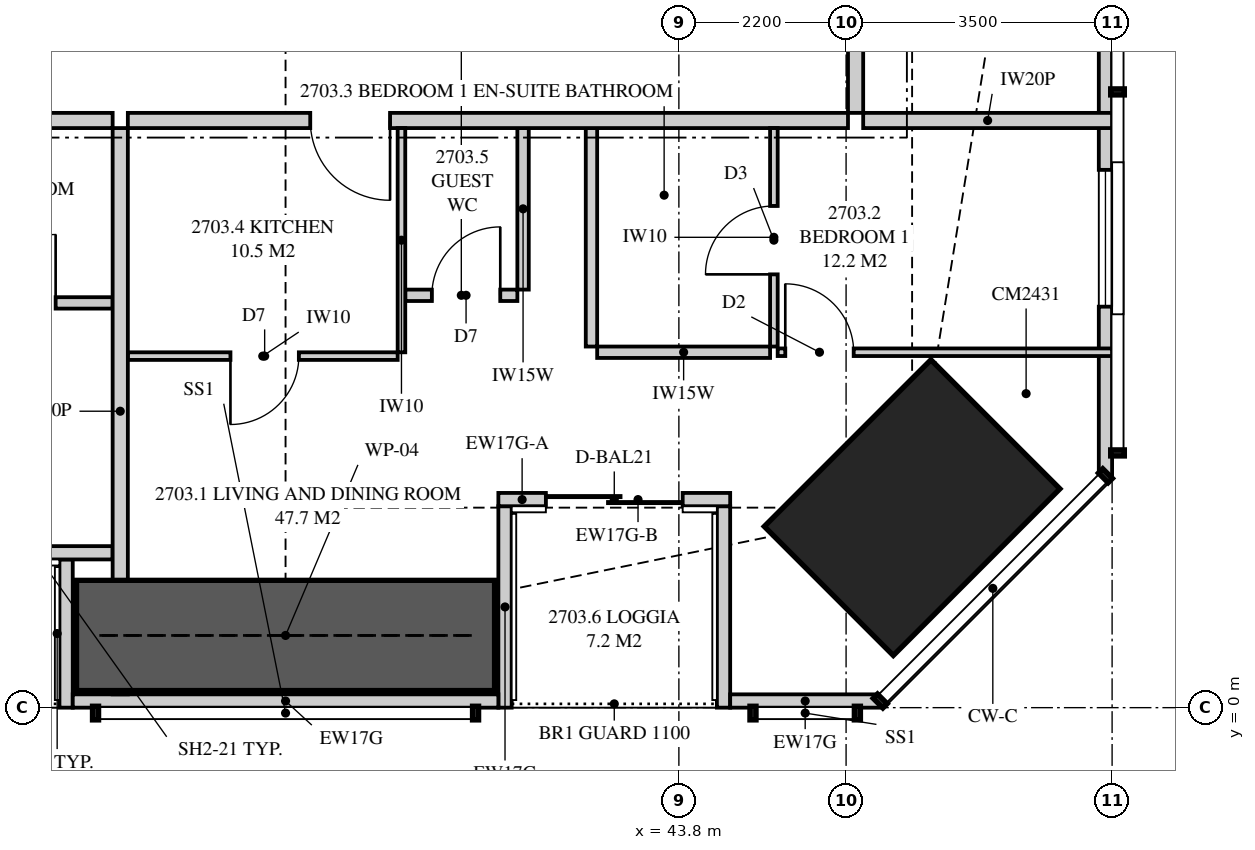
"""IFC4 building model, lengths in metres.
Left out: names, types, materials, properties, quantities, classifications, styles, units other than length and angle.
Written with IfcOpenShell. Run it as: python <this file> out.ifc"""

import sys

from ifc_helpers import new_model, si_unit, direction, frame, frame_2d, origin, origin_2d, place, context, subcontext, project, spatial, polyline, rectangle, outline, extrude, element, fill, save


model = new_model("IFC4")
c1 = context("Model", 3, precision=1e-05, world=origin(), true_north=direction((0.0, 1.0)))
c2 = subcontext(c1, "Body", "Model", "MODEL_VIEW")
j1 = project(units=[si_unit("LENGTHUNIT", "METRE"), si_unit("PLANEANGLEUNIT", "RADIAN")], contexts=[c1])
p1 = place(None, origin())
s1 = spatial("IfcSite", under=j1, at=p1, CompositionType="ELEMENT")
p2 = place(p1, origin())
s2 = spatial("IfcBuilding", under=s1, at=p2, CompositionType="ELEMENT")
p3 = place(p2, frame((0.0, 0.0, 101.5)))
s3 = spatial("IfcBuildingStorey", under=s2, at=p3, CompositionType="ELEMENT", Elevation=101.5)
p4 = place(p3, frame((46.869, 2.631, 0.0), z_axis=(0.0, 0.0, 1.0), x_axis=(-0.707106781187, 0.707106781187, 0.0)))
e1 = element("IfcColumn", 1, at=p4, inside=s3, PredefinedType="COLUMN", context=c2, shape_type="SweptSolid", body=[
    extrude(rectangle(XDim=2.4, YDim=3.1, at=origin_2d()), origin(), (0.0, 0.0, 1.0), 3.35),
])
p5 = place(p3, frame((35.825, 0.087, 0.0), z_axis=(0.0, 0.0, 1.0), x_axis=(1.0, 0.0, 0.0)))
e2 = element("IfcWall", 2, at=p5, inside=s3, PredefinedType="SOLIDWALL", context=c2, shape_type="SweptSolid", body=[
    extrude(outline(polyline([(0.0, 0.0), (5.6, 0.0), (5.6, 3.11), (3.003, 3.11), (3.003, 2.15), (2.958, 2.15), (2.958, 3.11), (2.8, 3.11), (2.8, 2.15), (0.0, 2.15), (0.0, 0.0)])), frame((0.0, 0.087, 0.0), z_axis=(0.0, -1.0, 0.0), x_axis=(1.0, 0.0, 0.0)), (0.0, 0.0, 1.0), 0.175),
])
p6 = place(p3, frame((44.475, 0.087, 0.0), z_axis=(0.0, 0.0, 1.0), x_axis=(1.0, 0.0, 0.0)))
e3 = element("IfcWall", 3, at=p6, inside=s3, PredefinedType="SOLIDWALL", context=c2, shape_type="SweptSolid", body=[
    extrude(rectangle(XDim=1.974, YDim=0.175, at=frame_2d((0.987, 0.0))), origin(), (0.0, 0.0, 1.0), 3.11),
])
p7 = place(p3, frame((32.775, 2.038, 0.0), z_axis=(0.0, 0.0, 1.0), x_axis=(1.0, 0.0, 0.0)))
e4 = element("IfcWall", 4, at=p7, inside=s3, PredefinedType="SOLIDWALL", context=c2, shape_type="SweptSolid", body=[
    extrude(rectangle(XDim=3.575, YDim=0.175, at=frame_2d((1.788, 0.0))), origin(), (0.0, 0.0, 1.0), 3.11),
])
p8 = place(p7, frame((0.625, 0.0, 0.0)))
e5 = element("IfcOpeningElement", 5, at=p8, cuts=e4, PredefinedType="OPENING", context=c2, shape_type="SweptSolid", body=[
    extrude(rectangle(XDim=1.8, YDim=2.1, at=frame_2d((0.9, 1.05))), frame((0.0, 0.097, 0.0), z_axis=(0.0, -1.0, 0.0), x_axis=(1.0, 0.0, 0.0)), (0.0, 0.0, 1.0), 0.195),
])
p9 = place(p3, frame((35.738, 0.0, 0.0), z_axis=(0.0, 0.0, 1.0), x_axis=(0.0, 1.0, 0.0)))
e6 = element("IfcWall", 6, at=p9, inside=s3, PredefinedType="SOLIDWALL", context=c2, shape_type="SweptSolid", body=[
    extrude(outline(polyline([(0.0, 0.0), (1.95, 0.0), (1.95, 3.11), (1.75, 3.11), (1.75, 2.15), (0.15, 2.15), (0.15, 3.11), (0.0, 3.11), (0.0, 0.0)])), frame((0.0, 0.087, 0.0), z_axis=(0.0, -1.0, 0.0), x_axis=(1.0, 0.0, 0.0)), (0.0, 0.0, 1.0), 0.175),
])
p10 = place(p3, frame((41.425, 2.738, 0.0), z_axis=(0.0, 0.0, 1.0), x_axis=(1.0, 0.0, 0.0)))
e7 = element("IfcWall", 7, at=p10, inside=s3, PredefinedType="SOLIDWALL", context=c2, shape_type="SweptSolid", body=[
    extrude(rectangle(XDim=0.625, YDim=0.175, at=frame_2d((0.312, 0.0))), origin(), (0.0, 0.0, 1.0), 2.51),
])
p11 = place(p3, frame((42.05, 2.738, 0.0), z_axis=(0.0, 0.0, 1.0), x_axis=(1.0, 0.0, 0.0)))
e8 = element("IfcWall", 8, at=p11, inside=s3, PredefinedType="SOLIDWALL", context=c2, shape_type="SweptSolid", body=[
    extrude(rectangle(XDim=2.425, YDim=0.175, at=frame_2d((1.212, 0.0))), origin(), (0.0, 0.0, 1.0), 2.15),
])
p12 = place(p11, origin())
e9 = element("IfcOpeningElement", 9, at=p12, cuts=e8, PredefinedType="OPENING", context=c2, shape_type="SweptSolid", body=[
    extrude(rectangle(XDim=1.8, YDim=2.1, at=frame_2d((0.9, 1.05))), frame((0.0, 0.097, 0.0), z_axis=(0.0, -1.0, 0.0), x_axis=(1.0, 0.0, 0.0)), (0.0, 0.0, 1.0), 0.195),
])
p13 = place(p3, frame((41.512, 0.0, 0.0), z_axis=(0.0, 0.0, 1.0), x_axis=(0.0, 1.0, 0.0)))
e10 = element("IfcWall", 10, at=p13, inside=s3, PredefinedType="SOLIDWALL", context=c2, shape_type="SweptSolid", body=[
    extrude(outline(polyline([(0.0, 0.0), (2.65, 0.0), (2.65, 2.51), (2.373, 2.51), (2.373, 2.15), (0.705, 2.15), (0.705, 3.11), (0.0, 3.11), (0.0, 0.0)])), frame((0.0, 0.087, 0.0), z_axis=(0.0, -1.0, 0.0), x_axis=(1.0, 0.0, 0.0)), (0.0, 0.0, 1.0), 0.175),
])
p14 = place(p3, frame((44.387, 0.0, 0.0), z_axis=(0.0, 0.0, 1.0), x_axis=(0.0, 1.0, 0.0)))
e11 = element("IfcWall", 11, at=p14, inside=s3, PredefinedType="SOLIDWALL", context=c2, shape_type="SweptSolid", body=[
    extrude(outline(polyline([(0.0, 0.0), (2.65, 0.0), (2.65, 2.15), (1.291, 2.15), (1.291, 3.11), (0.0, 3.11), (0.0, 0.0)])), frame((0.0, 0.087, 0.0), z_axis=(0.0, -1.0, 0.0), x_axis=(1.0, 0.0, 0.0)), (0.0, 0.0, 1.0), 0.175),
])
p15 = place(p3, frame((49.413, 3.051, 0.0), z_axis=(0.0, 0.0, 1.0), x_axis=(0.0, 1.0, 0.0)))
e12 = element("IfcWall", 12, at=p15, inside=s3, PredefinedType="SOLIDWALL", context=c2, shape_type="SweptSolid", body=[
    extrude(outline(polyline([(0.0, 0.0), (31.897, 0.0), (31.897, 3.11), (22.167, 3.11), (22.167, 2.15), (22.074, 2.15), (22.074, 3.11), (21.949, 3.11), (21.949, 2.15), (9.949, 2.15), (9.949, 3.11), (9.823, 3.11), (9.823, 2.15), (9.73, 2.15), (9.73, 3.11), (0.0, 3.11), (0.0, 0.0)])), frame((0.0, 0.087, 0.0), z_axis=(0.0, -1.0, 0.0), x_axis=(1.0, 0.0, 0.0)), (0.0, 0.0, 1.0), 0.175),
])
p16 = place(p15, frame((2.224, 0.0, 0.4)))
e13 = element("IfcOpeningElement", 13, at=p16, cuts=e12, PredefinedType="OPENING", context=c2, shape_type="SweptSolid", body=[
    extrude(rectangle(XDim=1.8, YDim=1.7, at=frame_2d((0.9, 0.85))), frame((0.0, 0.097, 0.0), z_axis=(0.0, -1.0, 0.0), x_axis=(1.0, 0.0, 0.0)), (0.0, 0.0, 1.0), 0.195),
])
p17 = place(p15, frame((14.849, 0.0, 0.4)))
e14 = element("IfcOpeningElement", 14, at=p17, cuts=e12, PredefinedType="OPENING", context=c2, shape_type="SweptSolid", body=[
    extrude(rectangle(XDim=1.2, YDim=1.7, at=frame_2d((0.6, 0.85))), frame((0.0, 0.097, 0.0), z_axis=(0.0, -1.0, 0.0), x_axis=(1.0, 0.0, 0.0)), (0.0, 0.0, 1.0), 0.195),
])
p18 = place(p15, frame((27.373, 0.0, 0.4)))
e15 = element("IfcOpeningElement", 15, at=p18, cuts=e12, PredefinedType="OPENING", context=c2, shape_type="SweptSolid", body=[
    extrude(rectangle(XDim=1.8, YDim=1.7, at=frame_2d((0.9, 0.85))), frame((0.0, 0.097, 0.0), z_axis=(0.0, -1.0, 0.0), x_axis=(1.0, 0.0, 0.0)), (0.0, 0.0, 1.0), 0.195),
])
p19 = place(p3, frame((36.45, 0.175, 0.0), z_axis=(0.0, 0.0, 1.0), x_axis=(0.0, 1.0, 0.0)))
e16 = element("IfcWall", 16, at=p19, inside=s3, PredefinedType="PARTITIONING", context=c2, shape_type="SweptSolid", body=[
    extrude(outline(polyline([(0.529, 2.15), (0.0, 2.15), (0.0, 0.0), (0.529, 0.0), (0.529, 0.017), (1.021, 0.017), (1.021, 0.0), (7.45, 0.0), (7.45, 3.11), (1.685, 3.11), (1.685, 2.15), (1.021, 2.15), (1.021, 2.133), (0.529, 2.133), (0.529, 2.15)])), frame((0.0, 0.1, 0.0), z_axis=(0.0, -1.0, 0.0), x_axis=(1.0, 0.0, 0.0)), (0.0, 0.0, 1.0), 0.2),
])
p20 = place(p3, frame((28.9, 7.725, 0.0), z_axis=(0.0, 0.0, 1.0), x_axis=(1.0, 0.0, 0.0)))
e17 = element("IfcWall", 17, at=p20, inside=s3, PredefinedType="PARTITIONING", context=c2, shape_type="SweptSolid", body=[
    extrude(rectangle(XDim=7.45, YDim=0.2, at=frame_2d((3.725, 0.0))), origin(), (0.0, 0.0, 1.0), 3.11),
])
p21 = place(p20, frame((3.225, 0.0, 0.0)))
e18 = element("IfcOpeningElement", 18, at=p21, cuts=e17, PredefinedType="OPENING", context=c2, shape_type="SweptSolid", body=[
    extrude(rectangle(XDim=1.05, YDim=2.2, at=frame_2d((0.525, 1.1))), frame((0.0, 0.11, 0.0), z_axis=(0.0, -1.0, 0.0), x_axis=(1.0, 0.0, 0.0)), (0.0, 0.0, 1.0), 0.22),
])
p22 = place(p3, frame((33.925, 5.325, 0.0), z_axis=(0.0, 0.0, 1.0), x_axis=(1.0, 0.0, 0.0)))
e19 = element("IfcWall", 19, at=p22, inside=s3, PredefinedType="PLUMBINGWALL", context=c2, shape_type="SweptSolid", body=[
    extrude(rectangle(XDim=2.425, YDim=0.15, at=frame_2d((1.212, 0.0))), origin(), (0.0, 0.0, 1.0), 3.11),
])
p23 = place(p22, frame((0.775, 0.0, 0.0)))
e20 = element("IfcOpeningElement", 20, at=p23, cuts=e19, PredefinedType="OPENING", context=c2, shape_type="SweptSolid", body=[
    extrude(rectangle(XDim=0.9, YDim=2.1, at=frame_2d((0.45, 1.05))), frame((0.0, 0.085, 0.0), z_axis=(0.0, -1.0, 0.0), x_axis=(1.0, 0.0, 0.0)), (0.0, 0.0, 1.0), 0.17),
])
p24 = place(p3, frame((36.55, 7.725, 0.0), z_axis=(0.0, 0.0, 1.0), x_axis=(1.0, 0.0, 0.0)))
e21 = element("IfcWall", 21, at=p24, inside=s3, PredefinedType="PARTITIONING", context=c2, shape_type="SweptSolid", body=[
    extrude(outline(polyline([(0.0, 0.0), (9.475, 0.0), (9.475, 3.11), (2.412, 3.11), (2.412, 2.541), (1.738, 2.541), (1.738, 3.11), (0.0, 3.11), (0.0, 0.0)])), frame((0.0, 0.1, 0.0), z_axis=(0.0, -1.0, 0.0), x_axis=(1.0, 0.0, 0.0)), (0.0, 0.0, 1.0), 0.2),
])
p25 = place(p24, frame((2.4, 0.0, 0.0)))
e22 = element("IfcOpeningElement", 22, at=p25, cuts=e21, PredefinedType="OPENING", context=c2, shape_type="SweptSolid", body=[
    extrude(rectangle(XDim=1.05, YDim=2.2, at=frame_2d((0.525, 1.1))), frame((0.0, 0.11, 0.0), z_axis=(0.0, -1.0, 0.0), x_axis=(1.0, 0.0, 0.0)), (0.0, 0.0, 1.0), 0.22),
])
p26 = place(p3, frame((45.05, 4.751, 0.0), z_axis=(0.0, 0.0, 1.0), x_axis=(0.0, 1.0, 0.0)))
e23 = element("IfcWall", 23, at=p26, inside=s3, PredefinedType="PARTITIONING", context=c2, shape_type="SweptSolid", body=[
    extrude(rectangle(XDim=2.874, YDim=0.1, at=frame_2d((1.437, 0.0))), origin(), (0.0, 0.0, 1.0), 3.11),
])
p27 = place(p26, frame((0.949, 0.0, 0.0)))
e24 = element("IfcOpeningElement", 24, at=p27, cuts=e23, PredefinedType="OPENING", context=c2, shape_type="SweptSolid", body=[
    extrude(rectangle(XDim=0.9, YDim=2.1, at=frame_2d((0.45, 1.05))), frame((0.0, 0.06, 0.0), z_axis=(0.0, -1.0, 0.0), x_axis=(1.0, 0.0, 0.0)), (0.0, 0.0, 1.0), 0.12),
])
p28 = place(p3, frame((45.1, 4.676, 0.0), z_axis=(0.0, 0.0, 1.0), x_axis=(1.0, 0.0, 0.0)))
e25 = element("IfcWall", 25, at=p28, inside=s3, PredefinedType="PARTITIONING", context=c2, shape_type="SweptSolid", body=[
    extrude(outline(polyline([(0.0, 0.0), (4.4, 0.0), (4.4, 3.11), (2.971, 3.11), (2.971, 2.15), (1.229, 2.15), (1.229, 3.11), (0.0, 3.11), (0.0, 0.0)])), frame((0.0, 0.05, 0.0), z_axis=(0.0, -1.0, 0.0), x_axis=(1.0, 0.0, 0.0)), (0.0, 0.0, 1.0), 0.1),
])
p29 = place(p28, frame((0.1, 0.0, 0.0)))
e26 = element("IfcOpeningElement", 26, at=p29, cuts=e25, PredefinedType="OPENING", context=c2, shape_type="SweptSolid", body=[
    extrude(rectangle(XDim=0.9, YDim=2.1, at=frame_2d((0.45, 1.05))), frame((0.0, 0.06, 0.0), z_axis=(0.0, -1.0, 0.0), x_axis=(1.0, 0.0, 0.0)), (0.0, 0.0, 1.0), 0.12),
])
p30 = place(p3, frame((42.725, 4.676, 0.0), z_axis=(0.0, 0.0, 1.0), x_axis=(1.0, 0.0, 0.0)))
e27 = element("IfcWall", 27, at=p30, inside=s3, PredefinedType="PLUMBINGWALL", context=c2, shape_type="SweptSolid", body=[
    extrude(rectangle(XDim=2.275, YDim=0.15, at=frame_2d((1.137, 0.0))), origin(), (0.0, 0.0, 1.0), 3.11),
])
p31 = place(p3, frame((42.65, 4.751, 0.0), z_axis=(0.0, 0.0, 1.0), x_axis=(0.0, 1.0, 0.0)))
e28 = element("IfcWall", 28, at=p31, inside=s3, PredefinedType="PLUMBINGWALL", context=c2, shape_type="SweptSolid", body=[
    extrude(rectangle(XDim=2.874, YDim=0.15, at=frame_2d((1.437, 0.0))), origin(), (0.0, 0.0, 1.0), 3.11),
])
p32 = place(p3, frame((36.55, 4.625, 0.0), z_axis=(0.0, 0.0, 1.0), x_axis=(1.0, 0.0, 0.0)))
e29 = element("IfcWall", 29, at=p32, inside=s3, PredefinedType="PARTITIONING", context=c2, shape_type="SweptSolid", body=[
    extrude(outline(polyline([(0.0, 0.0), (3.55, 0.0), (3.55, 3.11), (2.362, 3.11), (2.362, 2.541), (1.788, 2.541), (1.788, 3.11), (0.0, 3.11), (0.0, 0.0)])), frame((0.0, 0.05, 0.0), z_axis=(0.0, -1.0, 0.0), x_axis=(1.0, 0.0, 0.0)), (0.0, 0.0, 1.0), 0.1),
])
p33 = place(p32, frame((1.35, 0.0, 0.0)))
e30 = element("IfcOpeningElement", 30, at=p33, cuts=e29, PredefinedType="OPENING", context=c2, shape_type="SweptSolid", body=[
    extrude(rectangle(XDim=0.9, YDim=2.1, at=frame_2d((0.45, 1.05))), frame((0.0, 0.06, 0.0), z_axis=(0.0, -1.0, 0.0), x_axis=(1.0, 0.0, 0.0)), (0.0, 0.0, 1.0), 0.12),
])
p34 = place(p3, frame((40.15, 4.675, 0.0), z_axis=(0.0, 0.0, 1.0), x_axis=(0.0, 1.0, 0.0)))
e31 = element("IfcWall", 31, at=p34, inside=s3, PredefinedType="PARTITIONING", context=c2, shape_type="SweptSolid", body=[
    extrude(rectangle(XDim=2.95, YDim=0.1, at=frame_2d((1.475, 0.0))), origin(), (0.0, 0.0, 1.0), 3.11),
])
p35 = place(p3, frame((40.2, 5.425, 0.0), z_axis=(0.0, 0.0, 1.0), x_axis=(1.0, 0.0, 0.0)))
e32 = element("IfcWall", 32, at=p35, inside=s3, PredefinedType="PLUMBINGWALL", context=c2, shape_type="SweptSolid", body=[
    extrude(rectangle(XDim=1.475, YDim=0.15, at=frame_2d((0.738, 0.0))), origin(), (0.0, 0.0, 1.0), 3.11),
])
p36 = place(p35, frame((0.35, 0.0, 0.0)))
e33 = element("IfcOpeningElement", 33, at=p36, cuts=e32, PredefinedType="OPENING", context=c2, shape_type="SweptSolid", body=[
    extrude(rectangle(XDim=0.9, YDim=2.1, at=frame_2d((0.45, 1.05))), frame((0.0, 0.085, 0.0), z_axis=(0.0, -1.0, 0.0), x_axis=(1.0, 0.0, 0.0)), (0.0, 0.0, 1.0), 0.17),
])
p37 = place(p3, frame((41.75, 5.5, 0.0), z_axis=(0.0, 0.0, 1.0), x_axis=(0.0, 1.0, 0.0)))
e34 = element("IfcWall", 34, at=p37, inside=s3, PredefinedType="PLUMBINGWALL", context=c2, shape_type="SweptSolid", body=[
    extrude(rectangle(XDim=2.125, YDim=0.15, at=frame_2d((1.062, 0.0))), origin(), (0.0, 0.0, 1.0), 3.11),
])
p38 = place(p3, frame((46.225, 7.725, 0.0), z_axis=(0.0, 0.0, 1.0), x_axis=(1.0, 0.0, 0.0)))
e35 = element("IfcWall", 35, at=p38, inside=s3, PredefinedType="PARTITIONING", context=c2, shape_type="SweptSolid", body=[
    extrude(outline(polyline([(0.0, 0.0), (3.275, 0.0), (3.275, 3.11), (2.392, 3.11), (2.392, 2.15), (0.643, 2.15), (0.643, 2.541), (0.306, 2.541), (0.306, 3.11), (0.0, 3.11), (0.0, 0.0)])), frame((0.0, 0.1, 0.0), z_axis=(0.0, -1.0, 0.0), x_axis=(1.0, 0.0, 0.0)), (0.0, 0.0, 1.0), 0.2),
])
p39 = place(p3, frame((46.125, 7.825, 0.0), z_axis=(0.0, 0.0, 1.0), x_axis=(0.0, 1.0, 0.0)))
e36 = element("IfcWall", 36, at=p39, inside=s3, PredefinedType="PARTITIONING", context=c2, shape_type="SweptSolid", body=[
    extrude(outline(polyline([(0.0, 0.0), (8.475, 0.0), (8.475, 3.11), (5.512, 3.11), (5.512, 2.541), (4.838, 2.541), (4.838, 3.11), (0.0, 3.11), (0.0, 0.0)])), frame((0.0, 0.1, 0.0), z_axis=(0.0, -1.0, 0.0), x_axis=(1.0, 0.0, 0.0)), (0.0, 0.0, 1.0), 0.2),
])
p40 = place(p3, frame((35.875, 0.95, 0.0), z_axis=(0.0, 0.0, 1.0), x_axis=(1.0, 0.0, 0.0)))
e37 = element("IfcWall", 37, at=p40, inside=s3, PredefinedType="SHEAR", context=c2, shape_type="SweptSolid", body=[
    extrude(rectangle(XDim=5.5, YDim=1.45, at=frame_2d((2.75, 0.0))), origin(), (0.0, 0.0, 1.0), 3.35),
])
p41 = place(p12, origin())
e38 = element("IfcDoor", 38, at=p41, inside=s3, OperationType="SLIDING_TO_LEFT", PredefinedType="DOOR", context=c2, shape_type="SweptSolid", body=[
    extrude(rectangle(XDim=1.8, YDim=2.1, at=frame_2d((0.9, 1.05))), frame((0.0, 0.025, 0.0), z_axis=(0.0, -1.0, 0.0), x_axis=(1.0, 0.0, 0.0)), (0.0, 0.0, 1.0), 0.05),
])
fill(e9, e38)
p42 = place(p16, origin())
e39 = element("IfcWindow", 39, at=p42, inside=s3, PartitioningType="SINGLE_PANEL", PredefinedType="WINDOW", context=c2, shape_type="SweptSolid", body=[
    extrude(rectangle(XDim=1.8, YDim=1.7, at=frame_2d((0.9, 0.85))), frame((0.0, 0.03, 0.0), z_axis=(0.0, -1.0, 0.0), x_axis=(1.0, 0.0, 0.0)), (0.0, 0.0, 1.0), 0.06),
])
fill(e13, e39)
p43 = place(p23, origin())
e40 = element("IfcDoor", 40, at=p43, inside=s3, OperationType="SINGLE_SWING_RIGHT", PredefinedType="DOOR", context=c2, shape_type="SweptSolid", body=[
    extrude(rectangle(XDim=0.9, YDim=2.1, at=frame_2d((0.45, 1.05))), frame((0.0, 0.025, 0.0), z_axis=(0.0, -1.0, 0.0), x_axis=(1.0, 0.0, 0.0)), (0.0, 0.0, 1.0), 0.05),
])
fill(e20, e40)
p44 = place(p25, frame((1.05, 0.0, 0.0), z_axis=(0.0, 0.0, 1.0), x_axis=(-1.0, 0.0, 0.0)))
e41 = element("IfcDoor", 41, at=p44, inside=s3, OperationType="SINGLE_SWING_LEFT", PredefinedType="DOOR", context=c2, shape_type="SweptSolid", body=[
    extrude(rectangle(XDim=1.05, YDim=2.2, at=frame_2d((0.525, 1.1))), frame((0.0, 0.025, 0.0), z_axis=(0.0, -1.0, 0.0), x_axis=(1.0, 0.0, 0.0)), (0.0, 0.0, 1.0), 0.05),
])
fill(e22, e41)
p45 = place(p29, origin())
e42 = element("IfcDoor", 42, at=p45, inside=s3, OperationType="SINGLE_SWING_LEFT", PredefinedType="DOOR", context=c2, shape_type="SweptSolid", body=[
    extrude(rectangle(XDim=0.9, YDim=2.1, at=frame_2d((0.45, 1.05))), frame((0.0, 0.025, 0.0), z_axis=(0.0, -1.0, 0.0), x_axis=(1.0, 0.0, 0.0)), (0.0, 0.0, 1.0), 0.05),
])
fill(e26, e42)
p46 = place(p27, origin())
e43 = element("IfcDoor", 43, at=p46, inside=s3, OperationType="SINGLE_SWING_LEFT", PredefinedType="DOOR", context=c2, shape_type="SweptSolid", body=[
    extrude(rectangle(XDim=0.9, YDim=2.1, at=frame_2d((0.45, 1.05))), frame((0.0, 0.025, 0.0), z_axis=(0.0, -1.0, 0.0), x_axis=(1.0, 0.0, 0.0)), (0.0, 0.0, 1.0), 0.05),
])
fill(e24, e43)
p47 = place(p33, frame((0.9, 0.0, 0.0), z_axis=(0.0, 0.0, 1.0), x_axis=(-1.0, 0.0, 0.0)))
e44 = element("IfcDoor", 44, at=p47, inside=s3, OperationType="SINGLE_SWING_RIGHT", PredefinedType="DOOR", context=c2, shape_type="SweptSolid", body=[
    extrude(rectangle(XDim=0.9, YDim=2.1, at=frame_2d((0.45, 1.05))), frame((0.0, 0.025, 0.0), z_axis=(0.0, -1.0, 0.0), x_axis=(1.0, 0.0, 0.0)), (0.0, 0.0, 1.0), 0.05),
])
fill(e30, e44)
p48 = place(p36, origin())
e45 = element("IfcDoor", 45, at=p48, inside=s3, OperationType="SINGLE_SWING_RIGHT", PredefinedType="DOOR", context=c2, shape_type="SweptSolid", body=[
    extrude(rectangle(XDim=0.9, YDim=2.1, at=frame_2d((0.45, 1.05))), frame((0.0, 0.025, 0.0), z_axis=(0.0, -1.0, 0.0), x_axis=(1.0, 0.0, 0.0)), (0.0, 0.0, 1.0), 0.05),
])
fill(e33, e45)
save(model, sys.argv[1])
